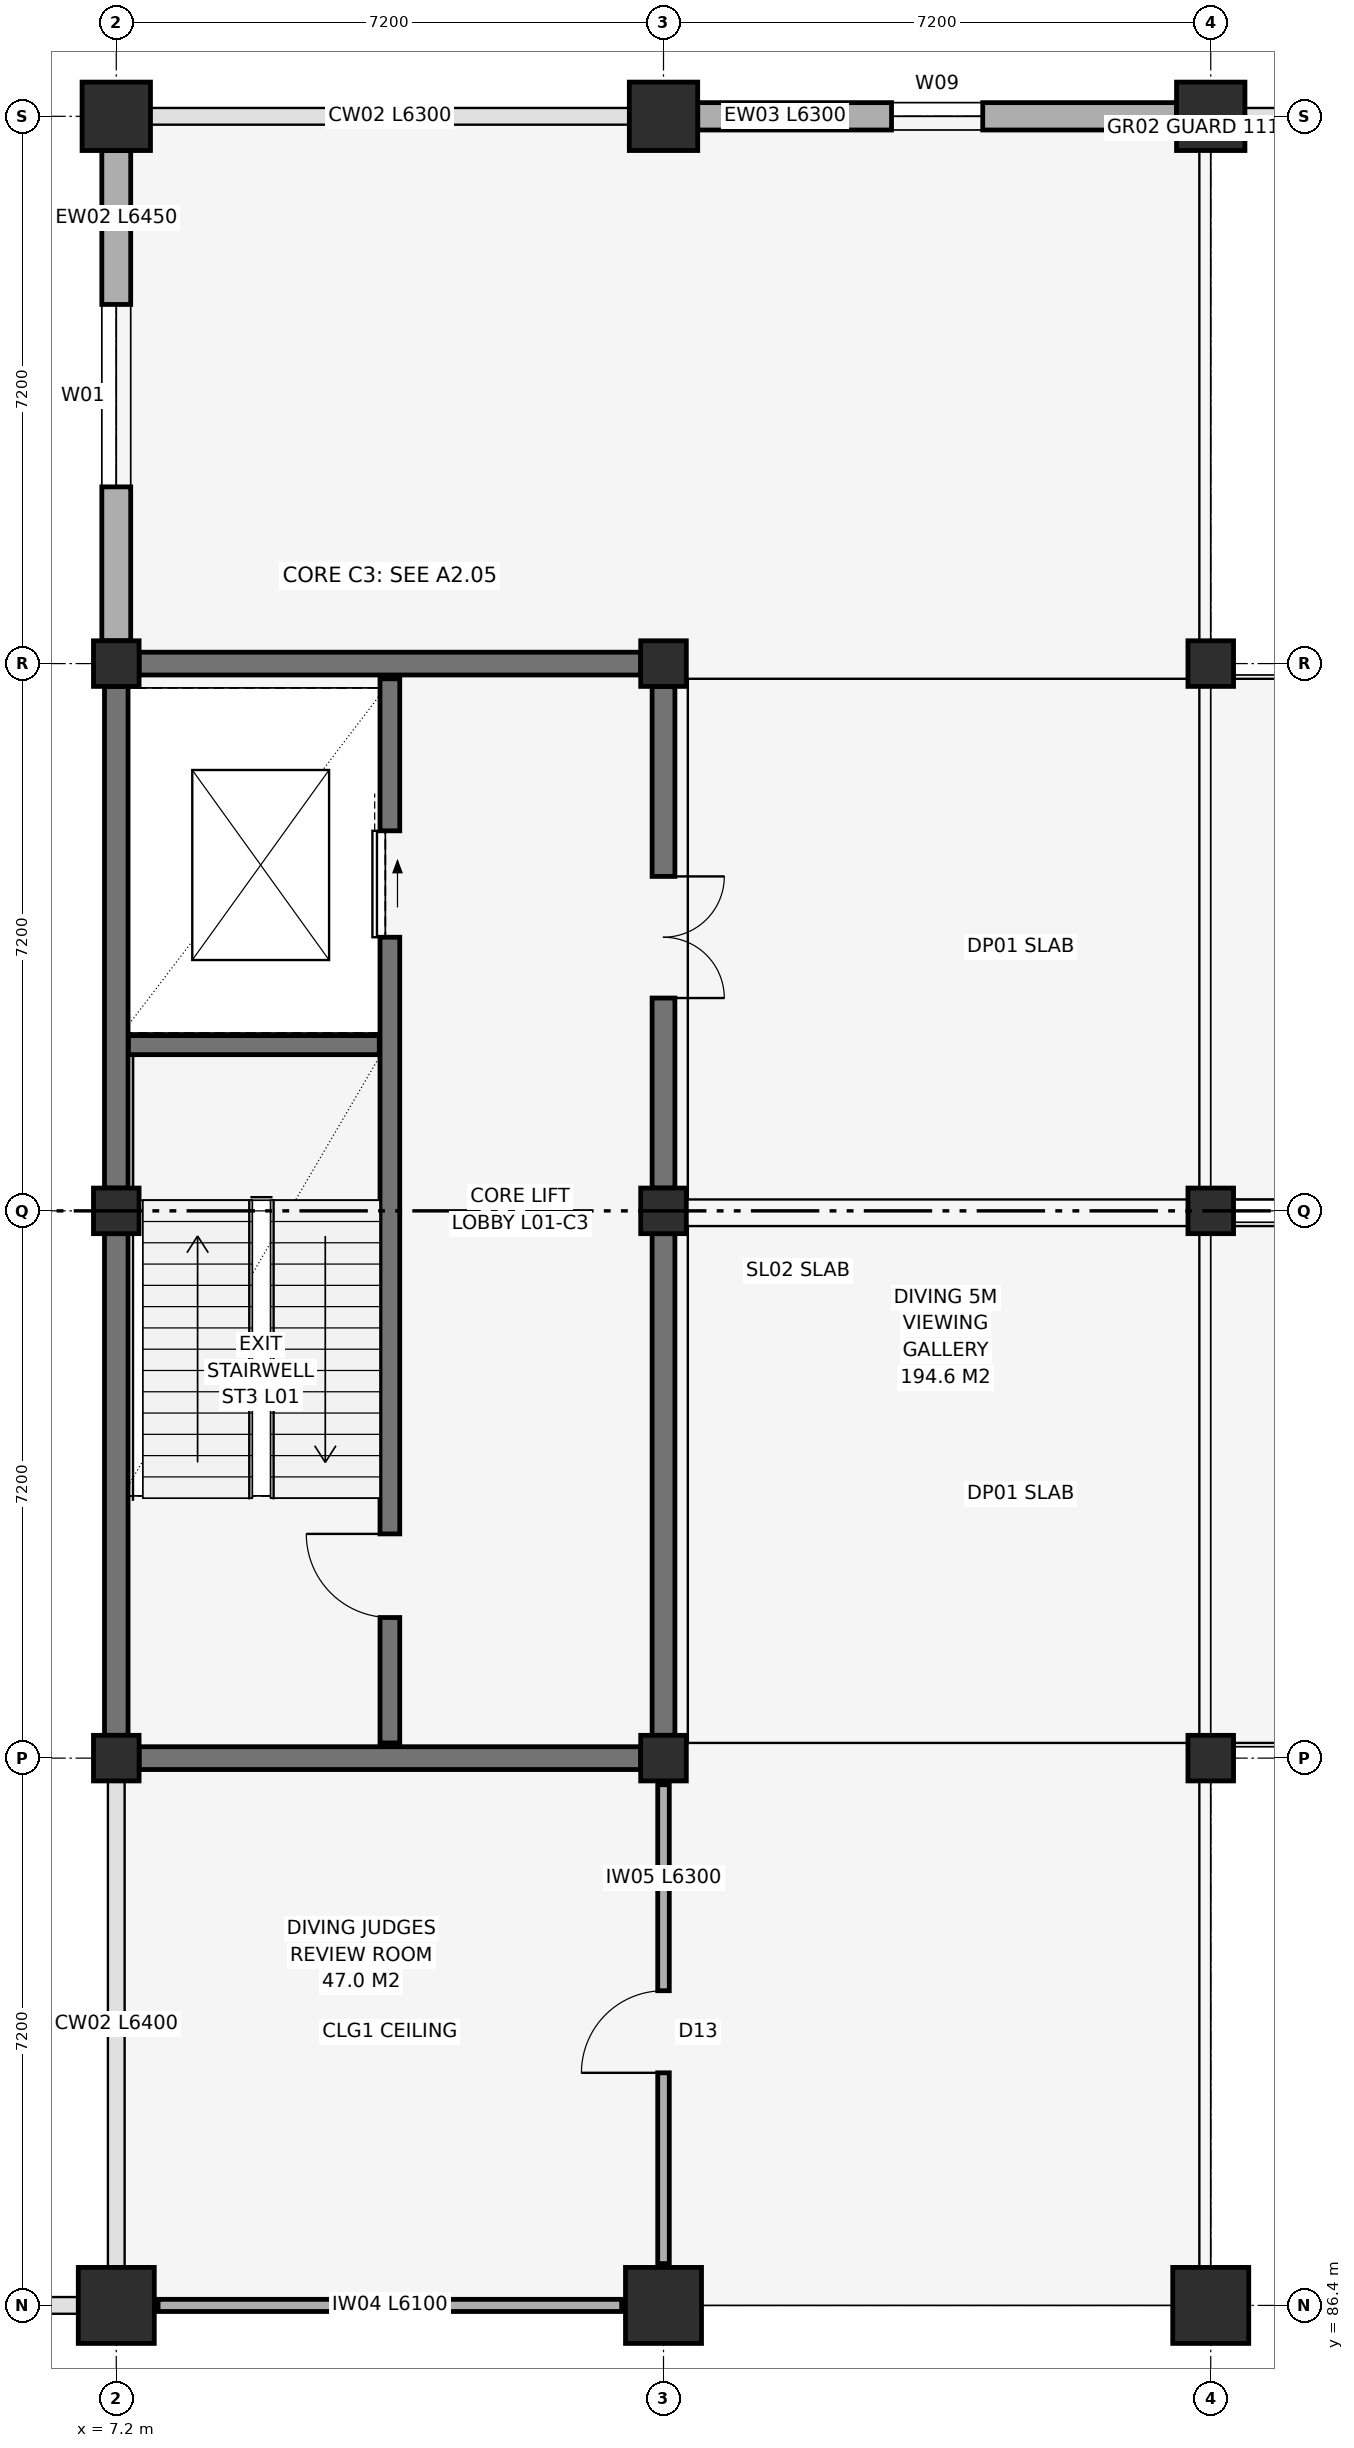
"""IFC4 building model, lengths in metres.
Left out: names, types, materials, properties, quantities, classifications, styles, units other than length and angle.
Written with IfcOpenShell. Run it as: python <this file> out.ifc"""

import sys

from ifc_helpers import new_model, si_unit, direction, frame, frame_2d, origin, origin_2d, place, context, subcontext, project, spatial, rectangle, extrude, element, fill, save


model = new_model("IFC4")
c1 = context("Model", 3, precision=1e-05, world=origin(), true_north=direction((0.0, 1.0)))
c2 = subcontext(c1, "Body", "Model", "MODEL_VIEW")
j1 = project(units=[si_unit("LENGTHUNIT", "METRE"), si_unit("PLANEANGLEUNIT", "RADIAN")], contexts=[c1])
p1 = place(None, origin())
s1 = spatial("IfcSite", under=j1, at=p1, CompositionType="ELEMENT")
p2 = place(p1, origin())
s2 = spatial("IfcBuilding", under=s1, at=p2, CompositionType="ELEMENT")
p3 = place(p2, frame((0.0, 0.0, 5.4)))
s3 = spatial("IfcBuildingStorey", under=s2, at=p3, CompositionType="ELEMENT", Elevation=5.4)
p4 = place(p3, frame((7.2, 86.4, 0.0), z_axis=(0.0, 0.0, 1.0), x_axis=(1.0, 0.0, 0.0)))
e1 = element("IfcColumn", 1, at=p4, inside=s3, PredefinedType="COLUMN", context=c2, shape_type="SweptSolid", body=[
    extrude(rectangle(XDim=1.0, YDim=1.0, at=origin_2d()), origin(), (0.0, 0.0, 1.0), 4.8),
])
for number, where, z_axis, x_axis in (
    (2, (7.2, 93.6, 0.0), (0.0, 0.0, 1.0), (1.0, 0.0, 0.0)),
    (3, (7.2, 100.8, 0.0), (0.0, 0.0, 1.0), (1.0, 0.0, 0.0)),
    (4, (7.2, 108.0, 0.0), (0.0, 0.0, 1.0), (1.0, 0.0, 0.0)),
):
    element("IfcColumn", number, at=place(p3, frame(where, z_axis=z_axis, x_axis=x_axis)), inside=s3, PredefinedType="COLUMN", context=c2, shape_type="SweptSolid", body=[
        extrude(rectangle(XDim=0.6, YDim=0.6, at=origin_2d()), origin(), (0.0, 0.0, 1.0), 4.8),
    ])
p5 = place(p3, frame((7.2, 115.2, 0.0), z_axis=(0.0, 0.0, 1.0), x_axis=(1.0, 0.0, 0.0)))
e5 = element("IfcColumn", 5, at=p5, inside=s3, PredefinedType="COLUMN", context=c2, shape_type="SweptSolid", body=[
    extrude(rectangle(XDim=0.9, YDim=0.9, at=origin_2d()), origin(), (0.0, 0.0, 1.0), 4.8),
])
p6 = place(p3, frame((14.4, 86.4, 0.0), z_axis=(0.0, 0.0, 1.0), x_axis=(1.0, 0.0, 0.0)))
e6 = element("IfcColumn", 6, at=p6, inside=s3, PredefinedType="COLUMN", context=c2, shape_type="SweptSolid", body=[
    extrude(rectangle(XDim=1.0, YDim=1.0, at=origin_2d()), origin(), (0.0, 0.0, 1.0), 4.8),
])
for number, where, z_axis, x_axis in (
    (7, (14.4, 93.6, 0.0), (0.0, 0.0, 1.0), (1.0, 0.0, 0.0)),
    (8, (14.4, 100.8, 0.0), (0.0, 0.0, 1.0), (1.0, 0.0, 0.0)),
    (9, (14.4, 108.0, 0.0), (0.0, 0.0, 1.0), (1.0, 0.0, 0.0)),
):
    element("IfcColumn", number, at=place(p3, frame(where, z_axis=z_axis, x_axis=x_axis)), inside=s3, PredefinedType="COLUMN", context=c2, shape_type="SweptSolid", body=[
        extrude(rectangle(XDim=0.6, YDim=0.6, at=origin_2d()), origin(), (0.0, 0.0, 1.0), 4.8),
    ])
p7 = place(p3, frame((14.4, 115.2, 0.0), z_axis=(0.0, 0.0, 1.0), x_axis=(1.0, 0.0, 0.0)))
e10 = element("IfcColumn", 10, at=p7, inside=s3, PredefinedType="COLUMN", context=c2, shape_type="SweptSolid", body=[
    extrude(rectangle(XDim=0.9, YDim=0.9, at=origin_2d()), origin(), (0.0, 0.0, 1.0), 4.8),
])
p8 = place(p3, frame((21.6, 86.4, 0.0), z_axis=(0.0, 0.0, 1.0), x_axis=(1.0, 0.0, 0.0)))
e11 = element("IfcColumn", 11, at=p8, inside=s3, PredefinedType="COLUMN", context=c2, shape_type="SweptSolid", body=[
    extrude(rectangle(XDim=1.0, YDim=1.0, at=origin_2d()), origin(), (0.0, 0.0, 1.0), 4.8),
])
for number, where, z_axis, x_axis in (
    (12, (21.6, 93.6, 0.0), (0.0, 0.0, 1.0), (1.0, 0.0, 0.0)),
    (13, (21.6, 100.8, 0.0), (0.0, 0.0, 1.0), (1.0, 0.0, 0.0)),
    (14, (21.6, 108.0, 0.0), (0.0, 0.0, 1.0), (1.0, 0.0, 0.0)),
):
    element("IfcColumn", number, at=place(p3, frame(where, z_axis=z_axis, x_axis=x_axis)), inside=s3, PredefinedType="COLUMN", context=c2, shape_type="SweptSolid", body=[
        extrude(rectangle(XDim=0.6, YDim=0.6, at=origin_2d()), origin(), (0.0, 0.0, 1.0), 4.8),
    ])
p9 = place(p3, frame((21.6, 115.2, 0.0), z_axis=(0.0, 0.0, 1.0), x_axis=(1.0, 0.0, 0.0)))
e15 = element("IfcColumn", 15, at=p9, inside=s3, PredefinedType="COLUMN", context=c2, shape_type="SweptSolid", body=[
    extrude(rectangle(XDim=0.9, YDim=0.9, at=origin_2d()), origin(), (0.0, 0.0, 1.0), 4.8),
])
p10 = place(p3, frame((14.85, 115.2, 0.0), z_axis=(0.0, 0.0, 1.0), x_axis=(1.0, 0.0, 0.0)))
e16 = element("IfcWall", 16, at=p10, inside=s3, PredefinedType="SOLIDWALL", context=c2, shape_type="SweptSolid", body=[
    extrude(rectangle(XDim=6.3, YDim=0.36, at=frame_2d((3.15, 0.0))), origin(), (0.0, 0.0, 1.0), 4.19),
])
p11 = place(p10, frame((2.55, 0.0, 0.95)))
e17 = element("IfcOpeningElement", 17, at=p11, cuts=e16, PredefinedType="OPENING", context=c2, shape_type="SweptSolid", body=[
    extrude(rectangle(XDim=1.2, YDim=2.0, at=frame_2d((0.6, 1.0))), frame((0.0, 0.195, 0.0), z_axis=(0.0, -1.0, 0.0), x_axis=(1.0, 0.0, 0.0)), (0.0, 0.0, 1.0), 0.39),
])
p12 = place(p3, frame((7.2, 108.3, 0.0), z_axis=(0.0, 0.0, 1.0), x_axis=(0.0, 1.0, 0.0)))
e18 = element("IfcWall", 18, at=p12, inside=s3, PredefinedType="SOLIDWALL", context=c2, shape_type="SweptSolid", body=[
    extrude(rectangle(XDim=6.45, YDim=0.38, at=frame_2d((3.225, 0.0))), origin(), (0.0, 0.0, 1.0), 3.952),
])
p13 = place(p12, frame((2.025, 0.0, 0.95)))
e19 = element("IfcOpeningElement", 19, at=p13, cuts=e18, PredefinedType="OPENING", context=c2, shape_type="SweptSolid", body=[
    extrude(rectangle(XDim=2.4, YDim=2.65, at=frame_2d((1.2, 1.325))), frame((0.0, 0.205, 0.0), z_axis=(0.0, -1.0, 0.0), x_axis=(1.0, 0.0, 0.0)), (0.0, 0.0, 1.0), 0.41),
])
for number, where, z_axis, x_axis in (
    (20, (7.5, 93.6, 0.0), (0.0, 0.0, 1.0), (1.0, 0.0, 0.0)),
    (21, (7.5, 108.0, 0.0), (0.0, 0.0, 1.0), (1.0, 0.0, 0.0)),
):
    element("IfcWall", number, at=place(p3, frame(where, z_axis=z_axis, x_axis=x_axis)), inside=s3, PredefinedType="SHEAR", context=c2, shape_type="SweptSolid", body=[
        extrude(rectangle(XDim=6.6, YDim=0.3, at=frame_2d((3.3, 0.0))), origin(), (0.0, 0.0, 1.0), 4.54),
    ])
p14 = place(p3, frame((7.2, 93.9, 0.0), z_axis=(0.0, 0.0, 1.0), x_axis=(0.0, 1.0, 0.0)))
e22 = element("IfcWall", 22, at=p14, inside=s3, PredefinedType="SHEAR", context=c2, shape_type="SweptSolid", body=[
    extrude(rectangle(XDim=6.6, YDim=0.31, at=frame_2d((3.3, 0.0))), origin(), (0.0, 0.0, 1.0), 4.54),
])
p15 = place(p3, frame((7.2, 101.1, 0.0), z_axis=(0.0, 0.0, 1.0), x_axis=(0.0, 1.0, 0.0)))
e23 = element("IfcWall", 23, at=p15, inside=s3, PredefinedType="SHEAR", context=c2, shape_type="SweptSolid", body=[
    extrude(rectangle(XDim=6.6, YDim=0.31, at=frame_2d((3.3, 0.0))), origin(), (0.0, 0.0, 1.0), 4.54),
])
p16 = place(p3, frame((14.4, 93.9, 0.0), z_axis=(0.0, 0.0, 1.0), x_axis=(0.0, 1.0, 0.0)))
e24 = element("IfcWall", 24, at=p16, inside=s3, PredefinedType="SHEAR", context=c2, shape_type="SweptSolid", body=[
    extrude(rectangle(XDim=6.6, YDim=0.3, at=frame_2d((3.3, 0.0))), origin(), (0.0, 0.0, 1.0), 4.54),
])
p17 = place(p3, frame((14.4, 101.1, 0.0), z_axis=(0.0, 0.0, 1.0), x_axis=(0.0, 1.0, 0.0)))
e25 = element("IfcWall", 25, at=p17, inside=s3, PredefinedType="SHEAR", context=c2, shape_type="SweptSolid", body=[
    extrude(rectangle(XDim=6.6, YDim=0.3, at=frame_2d((3.3, 0.0))), origin(), (0.0, 0.0, 1.0), 4.54),
])
p18 = place(p17, frame((2.5, 0.0, 0.0)))
e26 = element("IfcOpeningElement", 26, at=p18, cuts=e25, PredefinedType="OPENING", context=c2, shape_type="SweptSolid", body=[
    extrude(rectangle(XDim=1.6, YDim=2.2, at=frame_2d((0.8, 1.1))), frame((0.0, 0.165, 0.0), z_axis=(0.0, -1.0, 0.0), x_axis=(1.0, 0.0, 0.0)), (0.0, 0.0, 1.0), 0.33),
])
p19 = place(p3, frame((10.8, 93.8, 0.0), z_axis=(0.0, 0.0, 1.0), x_axis=(0.0, 1.0, 0.0)))
e27 = element("IfcWall", 27, at=p19, inside=s3, PredefinedType="SHEAR", context=c2, shape_type="SweptSolid", body=[
    extrude(rectangle(XDim=14.0, YDim=0.26, at=frame_2d((7.0, 0.0))), origin(), (0.0, 0.0, 1.0), 4.54),
])
p20 = place(p19, frame((1.65, 0.0, 0.0)))
e28 = element("IfcOpeningElement", 28, at=p20, cuts=e27, PredefinedType="OPENING", context=c2, shape_type="SweptSolid", body=[
    extrude(rectangle(XDim=1.1, YDim=2.15, at=frame_2d((0.55, 1.075))), frame((0.0, 0.145, 0.0), z_axis=(0.0, -1.0, 0.0), x_axis=(1.0, 0.0, 0.0)), (0.0, 0.0, 1.0), 0.29),
])
p21 = place(p19, frame((10.6, 0.0, 0.0)))
e29 = element("IfcOpeningElement", 29, at=p21, cuts=e27, PredefinedType="OPENING", context=c2, shape_type="SweptSolid", body=[
    extrude(rectangle(XDim=1.4, YDim=2.3, at=frame_2d((0.7, 1.15))), frame((0.0, 0.145, 0.0), z_axis=(0.0, -1.0, 0.0), x_axis=(1.0, 0.0, 0.0)), (0.0, 0.0, 1.0), 0.29),
])
p22 = place(p3, frame((7.36, 102.98, 0.0), z_axis=(0.0, 0.0, 1.0), x_axis=(1.0, 0.0, 0.0)))
e30 = element("IfcWall", 30, at=p22, inside=s3, PredefinedType="SHEAR", context=c2, shape_type="SweptSolid", body=[
    extrude(rectangle(XDim=3.3, YDim=0.25, at=frame_2d((1.65, 0.0))), origin(), (0.0, 0.0, 1.0), 4.54),
])
p23 = place(p3, frame((7.75, 86.4, 0.0), z_axis=(0.0, 0.0, 1.0), x_axis=(1.0, 0.0, 0.0)))
e31 = element("IfcWall", 31, at=p23, inside=s3, PredefinedType="PARTITIONING", context=c2, shape_type="SweptSolid", body=[
    extrude(rectangle(XDim=6.1, YDim=0.16, at=frame_2d((3.05, 0.0))), origin(), (0.0, 0.0, 1.0), 3.952),
])
p24 = place(p3, frame((14.4, 86.95, 0.0), z_axis=(0.0, 0.0, 1.0), x_axis=(0.0, 1.0, 0.0)))
e32 = element("IfcWall", 32, at=p24, inside=s3, PredefinedType="PARTITIONING", context=c2, shape_type="SweptSolid", body=[
    extrude(rectangle(XDim=6.3, YDim=0.152, at=frame_2d((3.15, 0.0))), origin(), (0.0, 0.0, 1.0), 3.595),
])
p25 = place(p24, frame((2.51, 0.0, 0.0)))
e33 = element("IfcOpeningElement", 33, at=p25, cuts=e32, PredefinedType="OPENING", context=c2, shape_type="SweptSolid", body=[
    extrude(rectangle(XDim=1.08, YDim=2.15, at=frame_2d((0.54, 1.075))), frame((0.0, 0.091, 0.0), z_axis=(0.0, -1.0, 0.0), x_axis=(1.0, 0.0, 0.0)), (0.0, 0.0, 1.0), 0.182),
])
p26 = place(p11, origin())
e34 = element("IfcWindow", 34, at=p26, inside=s3, PartitioningType="SINGLE_PANEL", PredefinedType="WINDOW", context=c2, shape_type="SweptSolid", body=[
    extrude(rectangle(XDim=1.2, YDim=2.0, at=frame_2d((0.6, 1.0))), frame((0.0, 0.03, 0.0), z_axis=(0.0, -1.0, 0.0), x_axis=(1.0, 0.0, 0.0)), (0.0, 0.0, 1.0), 0.06),
])
fill(e17, e34)
p27 = place(p13, origin())
e35 = element("IfcWindow", 35, at=p27, inside=s3, PartitioningType="SINGLE_PANEL", PredefinedType="WINDOW", context=c2, shape_type="SweptSolid", body=[
    extrude(rectangle(XDim=2.4, YDim=2.65, at=frame_2d((1.2, 1.325))), frame((0.0, 0.03, 0.0), z_axis=(0.0, -1.0, 0.0), x_axis=(1.0, 0.0, 0.0)), (0.0, 0.0, 1.0), 0.06),
])
fill(e19, e35)
p28 = place(p20, origin())
e36 = element("IfcDoor", 36, at=p28, inside=s3, OperationType="SINGLE_SWING_RIGHT", PredefinedType="DOOR", context=c2, shape_type="SweptSolid", body=[
    extrude(rectangle(XDim=1.1, YDim=2.15, at=frame_2d((0.55, 1.075))), frame((0.0, 0.025, 0.0), z_axis=(0.0, -1.0, 0.0), x_axis=(1.0, 0.0, 0.0)), (0.0, 0.0, 1.0), 0.05),
])
fill(e28, e36)
p29 = place(p21, frame((1.4, 0.0, 0.0), z_axis=(0.0, 0.0, 1.0), x_axis=(-1.0, 0.0, 0.0)))
e37 = element("IfcDoor", 37, at=p29, inside=s3, OperationType="SLIDING_TO_RIGHT", PredefinedType="DOOR", context=c2, shape_type="SweptSolid", body=[
    extrude(rectangle(XDim=1.4, YDim=2.3, at=frame_2d((0.7, 1.15))), frame((0.0, 0.025, 0.0), z_axis=(0.0, -1.0, 0.0), x_axis=(1.0, 0.0, 0.0)), (0.0, 0.0, 1.0), 0.05),
])
fill(e29, e37)
p30 = place(p18, frame((1.6, 0.0, 0.0), z_axis=(0.0, 0.0, 1.0), x_axis=(-1.0, 0.0, 0.0)))
e38 = element("IfcDoor", 38, at=p30, inside=s3, OperationType="DOUBLE_SWING_LEFT", PredefinedType="DOOR", context=c2, shape_type="SweptSolid", body=[
    extrude(rectangle(XDim=1.6, YDim=2.2, at=frame_2d((0.8, 1.1))), frame((0.0, 0.025, 0.0), z_axis=(0.0, -1.0, 0.0), x_axis=(1.0, 0.0, 0.0)), (0.0, 0.0, 1.0), 0.05),
])
fill(e26, e38)
p31 = place(p25, origin())
e39 = element("IfcDoor", 39, at=p31, inside=s3, OperationType="SINGLE_SWING_LEFT", PredefinedType="DOOR", context=c2, shape_type="SweptSolid", body=[
    extrude(rectangle(XDim=1.08, YDim=2.15, at=frame_2d((0.54, 1.075))), frame((0.0, 0.025, 0.0), z_axis=(0.0, -1.0, 0.0), x_axis=(1.0, 0.0, 0.0)), (0.0, 0.0, 1.0), 0.05),
])
fill(e33, e39)
save(model, sys.argv[1])
